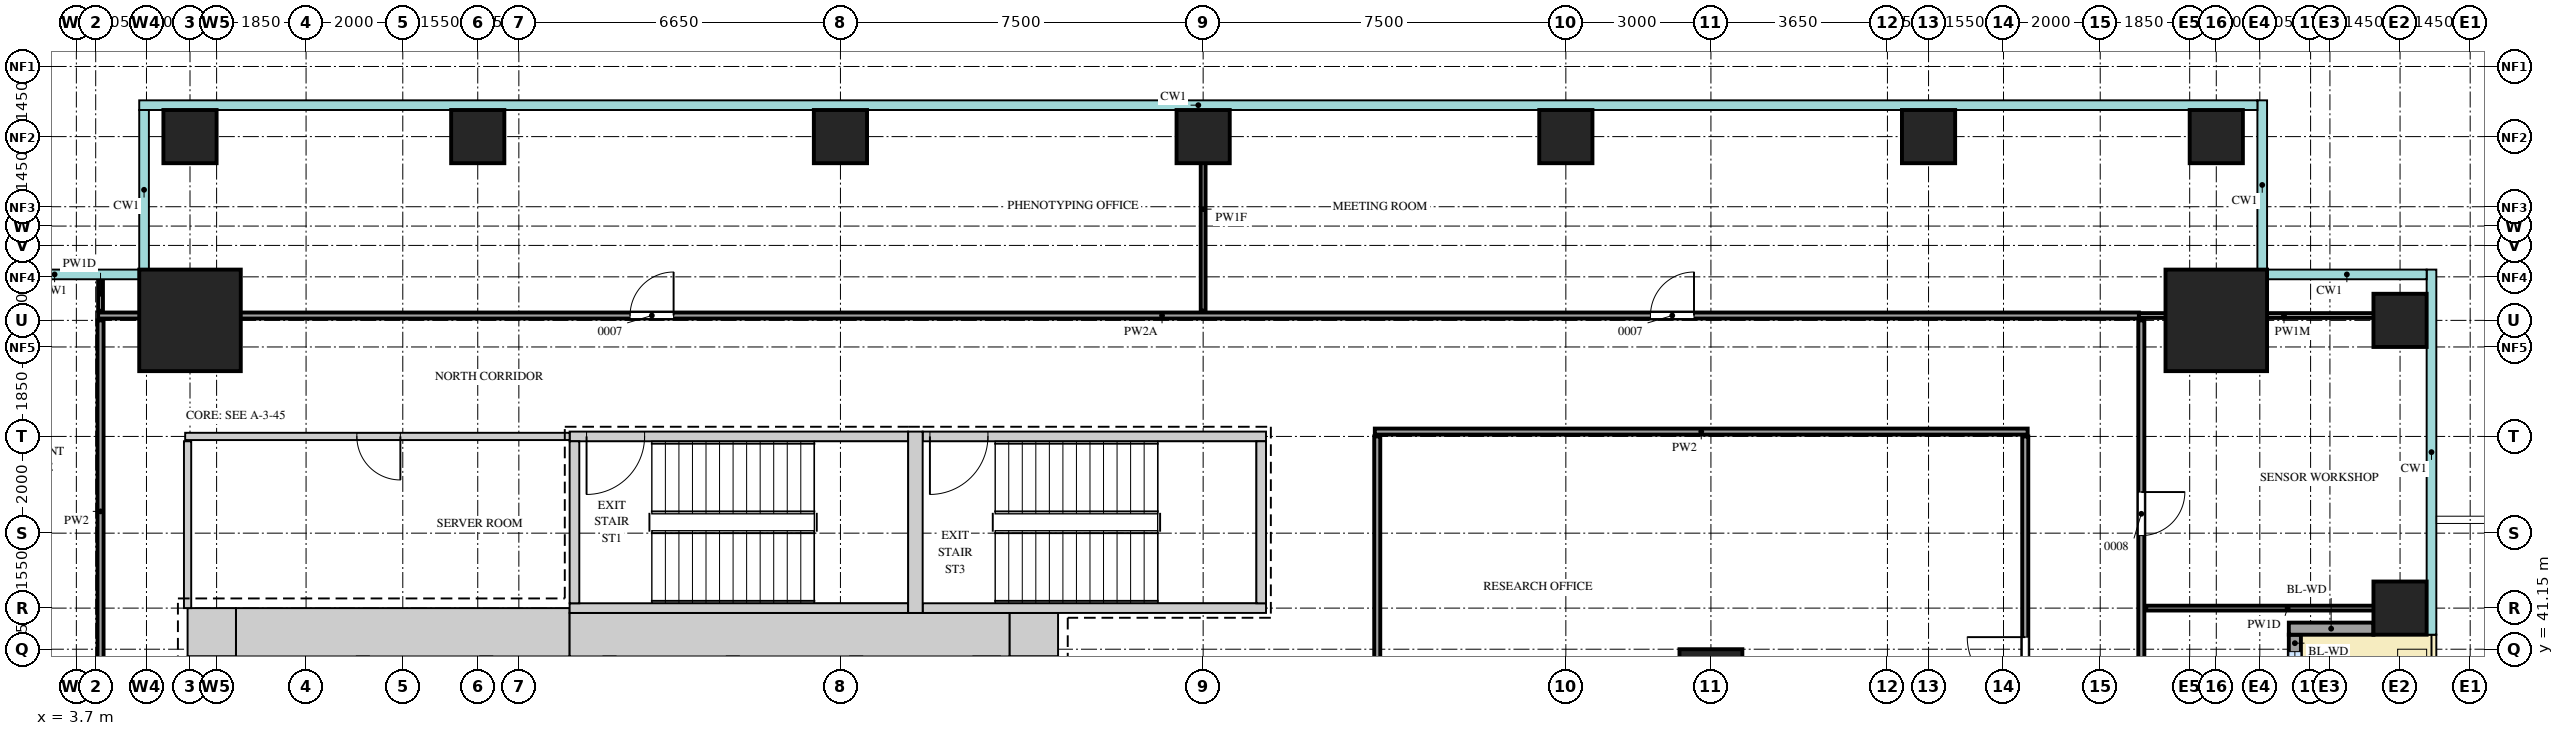
"""IFC4 building model, lengths in metres.
Left out: names, types, materials, properties, quantities, classifications, styles, units other than length and angle.
Written with IfcOpenShell. Run it as: python <this file> out.ifc"""

import sys

from ifc_helpers import new_model, si_unit, direction, frame, frame_2d, origin, origin_2d, place, context, subcontext, project, spatial, rectangle, extrude, source, transform, mapped, element, fill, save


model = new_model("IFC4")
c1 = context("Model", 3, precision=1e-05, world=origin(), true_north=direction((0.0, 1.0)))
c2 = subcontext(c1, "Body", "Model", "MODEL_VIEW")
j1 = project(units=[si_unit("LENGTHUNIT", "METRE"), si_unit("PLANEANGLEUNIT", "RADIAN")], contexts=[c1])
p1 = place(None, origin())
s1 = spatial("IfcSite", under=j1, at=p1, CompositionType="ELEMENT")
p2 = place(p1, origin())
s2 = spatial("IfcBuilding", under=s1, at=p2, CompositionType="ELEMENT")
p3 = place(p2, frame((0.0, 0.0, 132.3)))
s3 = spatial("IfcBuildingStorey", under=s2, at=p3, CompositionType="ELEMENT", Elevation=132.3)
m1 = source(origin(), c2, "Body", "SweptSolid", [
    extrude(rectangle(XDim=6.9, YDim=1.0, at=frame_2d((3.45, 0.0))), origin(), (0.0, 0.0, 1.0), 4.1),
])
p4 = place(p3, frame((7.0, 41.5, 0.0), z_axis=(0.0, 0.0, 1.0), x_axis=(1.0, 0.0, 0.0)))
e1 = element("IfcWall", 1, at=p4, inside=s3, PredefinedType="SHEAR", context=c2, shape_type="MappedRepresentation", body=[
    mapped(m1, transform((0.0, 0.0, 0.0))),
])
m2 = source(origin(), c2, "Body", "SweptSolid", [
    extrude(rectangle(XDim=9.1, YDim=0.9, at=frame_2d((4.55, 0.0))), origin(), (0.0, 0.0, 1.0), 4.1),
])
p5 = place(p3, frame((13.9, 41.45, 0.0), z_axis=(0.0, 0.0, 1.0), x_axis=(1.0, 0.0, 0.0)))
e2 = element("IfcWall", 2, at=p5, inside=s3, PredefinedType="SHEAR", context=c2, shape_type="MappedRepresentation", body=[
    mapped(m2, transform((0.0, 0.0, 0.0))),
])
m3 = source(origin(), c2, "Body", "SweptSolid", [
    extrude(rectangle(XDim=1.0, YDim=0.9, at=frame_2d((0.5, 0.0))), origin(), (0.0, 0.0, 1.0), 4.1),
])
p6 = place(p3, frame((23.0, 41.45, 0.0), z_axis=(0.0, 0.0, 1.0), x_axis=(1.0, 0.0, 0.0)))
e3 = element("IfcWall", 3, at=p6, inside=s3, PredefinedType="SHEAR", context=c2, shape_type="MappedRepresentation", body=[
    mapped(m3, transform((0.0, 0.0, 0.0))),
])
m4 = source(origin(), c2, "Body", "SweptSolid", [
    extrude(rectangle(XDim=1.0, YDim=1.0, at=frame_2d((0.5, 0.0))), origin(), (0.0, 0.0, 1.0), 4.1),
])
p7 = place(p3, frame((6.0, 41.5, 0.0), z_axis=(0.0, 0.0, 1.0), x_axis=(1.0, 0.0, 0.0)))
e4 = element("IfcWall", 4, at=p7, inside=s3, PredefinedType="SHEAR", context=c2, shape_type="MappedRepresentation", body=[
    mapped(m4, transform((0.0, 0.0, 0.0))),
])
m5 = source(origin(), c2, "Body", "SweptSolid", [
    extrude(rectangle(XDim=7.0, YDim=0.2, at=frame_2d((3.5, 0.0))), origin(), (0.0, 0.0, 1.0), 4.1),
])
p8 = place(p3, frame((13.9, 45.55, 0.0), z_axis=(0.0, 0.0, 1.0), x_axis=(1.0, 0.0, 0.0)))
e5 = element("IfcWall", 5, at=p8, inside=s3, PredefinedType="SHEAR", context=c2, shape_type="MappedRepresentation", body=[
    mapped(m5, transform((0.0, 0.0, 0.0))),
])
m6 = source(origin(), c2, "Body", "SweptSolid", [
    extrude(rectangle(XDim=1.2, YDim=2.1, at=frame_2d((0.6, 1.05))), frame((0.0, 0.11, 0.0), z_axis=(0.0, -1.0, 0.0), x_axis=(1.0, 0.0, 0.0)), (0.0, 0.0, 1.0), 0.22),
])
p9 = place(p8, frame((0.35, 0.0, 0.0)))
e6 = element("IfcOpeningElement", 6, at=p9, cuts=e5, PredefinedType="OPENING", context=c2, shape_type="MappedRepresentation", body=[
    mapped(m6, transform((0.0, 0.0, 0.0))),
])
p10 = place(p3, frame((13.9, 42.0, 0.0), z_axis=(0.0, 0.0, 1.0), x_axis=(1.0, 0.0, 0.0)))
e7 = element("IfcWall", 7, at=p10, inside=s3, PredefinedType="SHEAR", context=c2, shape_type="MappedRepresentation", body=[
    mapped(m5, transform((0.0, 0.0, 0.0))),
])
m7 = source(origin(), c2, "Body", "SweptSolid", [
    extrude(rectangle(XDim=7.1, YDim=0.2, at=frame_2d((3.55, 0.0))), origin(), (0.0, 0.0, 1.0), 4.1),
])
p11 = place(p3, frame((21.2, 45.55, 0.0), z_axis=(0.0, 0.0, 1.0), x_axis=(1.0, 0.0, 0.0)))
e8 = element("IfcWall", 8, at=p11, inside=s3, PredefinedType="SHEAR", context=c2, shape_type="MappedRepresentation", body=[
    mapped(m7, transform((0.0, 0.0, 0.0))),
])
p12 = place(p11, frame((0.15, 0.0, 0.0)))
e9 = element("IfcOpeningElement", 9, at=p12, cuts=e8, PredefinedType="OPENING", context=c2, shape_type="MappedRepresentation", body=[
    mapped(m6, transform((0.0, 0.0, 0.0))),
])
p13 = place(p3, frame((21.2, 42.0, 0.0), z_axis=(0.0, 0.0, 1.0), x_axis=(1.0, 0.0, 0.0)))
e10 = element("IfcWall", 10, at=p13, inside=s3, PredefinedType="SHEAR", context=c2, shape_type="MappedRepresentation", body=[
    mapped(m7, transform((0.0, 0.0, 0.0))),
])
m8 = source(origin(), c2, "Body", "SweptSolid", [
    extrude(rectangle(XDim=3.75, YDim=0.3, at=frame_2d((1.875, 0.0))), origin(), (0.0, 0.0, 1.0), 4.1),
])
p14 = place(p3, frame((21.05, 41.9, 0.0), z_axis=(0.0, 0.0, 1.0), x_axis=(0.0, 1.0, 0.0)))
e11 = element("IfcWall", 11, at=p14, inside=s3, PredefinedType="SHEAR", context=c2, shape_type="MappedRepresentation", body=[
    mapped(m8, transform((0.0, 0.0, 0.0))),
])
m9 = source(origin(), c2, "Body", "SweptSolid", [
    extrude(rectangle(XDim=3.35, YDim=0.2, at=frame_2d((1.675, 0.0))), origin(), (0.0, 0.0, 1.0), 4.1),
])
for number, where, z_axis, x_axis in (
    (12, (14.0, 42.1, 0.0), (0.0, 0.0, 1.0), (0.0, 1.0, 0.0)),
    (13, (28.2, 42.1, 0.0), (0.0, 0.0, 1.0), (0.0, 1.0, 0.0)),
):
    element("IfcWall", number, at=place(p3, frame(where, z_axis=z_axis, x_axis=x_axis)), inside=s3, PredefinedType="SHEAR", context=c2, shape_type="MappedRepresentation", body=[
        mapped(m9, transform((0.0, 0.0, 0.0))),
    ])
m10 = source(origin(), c2, "Body", "SweptSolid", [
    extrude(rectangle(XDim=2.1, YDim=2.1, at=origin_2d()), origin(), (0.0, 0.0, 1.0), 4.4),
])
for number, where, z_axis, x_axis in (
    (14, (47.95, 47.95, 0.0), (0.0, 0.0, 1.0), (1.0, 0.0, 0.0)),
    (15, (6.05, 47.95, 0.0), (0.0, 0.0, 1.0), (1.0, 0.0, 0.0)),
):
    element("IfcColumn", number, at=place(p3, frame(where, z_axis=z_axis, x_axis=x_axis)), inside=s3, PredefinedType="COLUMN", context=c2, shape_type="MappedRepresentation", body=[
        mapped(m10, transform((0.0, 0.0, 0.0))),
    ])
m11 = source(origin(), c2, "Body", "SweptSolid", [
    extrude(rectangle(XDim=1.1, YDim=1.1, at=origin_2d()), origin(), (0.0, 0.0, 1.0), 4.1),
])
for number, where, z_axis, x_axis in (
    (16, (51.75, 42.0, 0.0), (0.0, 0.0, 1.0), (1.0, 0.0, 0.0)),
    (17, (51.75, 47.95, 0.0), (0.0, 0.0, 1.0), (1.0, 0.0, 0.0)),
    (18, (6.05, 51.75, 0.0), (0.0, 0.0, 1.0), (1.0, 0.0, 0.0)),
    (19, (12.0, 51.75, 0.0), (0.0, 0.0, 1.0), (1.0, 0.0, 0.0)),
    (20, (19.5, 51.75, 0.0), (0.0, 0.0, 1.0), (1.0, 0.0, 0.0)),
    (21, (27.0, 51.75, 0.0), (0.0, 0.0, 1.0), (1.0, 0.0, 0.0)),
    (22, (34.5, 51.75, 0.0), (0.0, 0.0, 1.0), (1.0, 0.0, 0.0)),
    (23, (42.0, 51.75, 0.0), (0.0, 0.0, 1.0), (1.0, 0.0, 0.0)),
    (24, (47.95, 51.75, 0.0), (0.0, 0.0, 1.0), (1.0, 0.0, 0.0)),
):
    element("IfcColumn", number, at=place(p3, frame(where, z_axis=z_axis, x_axis=x_axis)), inside=s3, PredefinedType="COLUMN", context=c2, shape_type="MappedRepresentation", body=[
        mapped(m11, transform((0.0, 0.0, 0.0))),
    ])
m12 = source(origin(), c2, "Body", "SweptSolid", [
    extrude(rectangle(XDim=1.3, YDim=1.3, at=origin_2d()), origin(), (0.0, 0.0, 1.0), 4.1),
])
p15 = place(p3, frame((37.5, 40.5, 0.0), z_axis=(0.0, 0.0, 1.0), x_axis=(1.0, 0.0, 0.0)))
e25 = element("IfcColumn", 25, at=p15, inside=s3, PredefinedType="COLUMN", context=c2, shape_type="MappedRepresentation", body=[
    mapped(m12, transform((0.0, 0.0, 0.0))),
])
m13 = source(origin(), c2, "Body", "SweptSolid", [
    extrude(rectangle(XDim=6.4, YDim=0.25, at=frame_2d((3.2, 0.0))), origin(), (0.0, 0.0, 1.0), 3.55),
])
p16 = place(p3, frame((49.575, 35.05, 0.0), z_axis=(0.0, 0.0, 1.0), x_axis=(0.0, 1.0, 0.0)))
e26 = element("IfcWall", 26, at=p16, inside=s3, PredefinedType="SOLIDWALL", context=c2, shape_type="MappedRepresentation", body=[
    mapped(m13, transform((0.0, 0.0, 0.0))),
])
m14 = source(origin(), c2, "Body", "SweptSolid", [
    extrude(rectangle(XDim=1.65, YDim=2.4, at=frame_2d((0.825, 1.2))), frame((0.0, 0.135, 0.0), z_axis=(0.0, -1.0, 0.0), x_axis=(1.0, 0.0, 0.0)), (0.0, 0.0, 1.0), 0.27),
])
p17 = place(p16, frame((0.35, 0.0, 0.0)))
e27 = element("IfcOpeningElement", 27, at=p17, cuts=e26, PredefinedType="OPENING", context=c2, shape_type="MappedRepresentation", body=[
    mapped(m14, transform((0.0, 0.0, 0.0))),
])
p18 = place(p16, frame((4.4, 0.0, 0.0)))
e28 = element("IfcOpeningElement", 28, at=p18, cuts=e26, PredefinedType="OPENING", context=c2, shape_type="MappedRepresentation", body=[
    mapped(m14, transform((0.0, 0.0, 0.0))),
])
m15 = source(origin(), c2, "Body", "SweptSolid", [
    extrude(rectangle(XDim=1.8, YDim=2.4, at=frame_2d((0.9, 1.2))), frame((0.0, 0.135, 0.0), z_axis=(0.0, -1.0, 0.0), x_axis=(1.0, 0.0, 0.0)), (0.0, 0.0, 1.0), 0.27),
])
p19 = place(p16, frame((2.3, 0.0, 0.0)))
e29 = element("IfcOpeningElement", 29, at=p19, cuts=e26, PredefinedType="OPENING", context=c2, shape_type="MappedRepresentation", body=[
    mapped(m15, transform((0.0, 0.0, 0.0))),
])
m16 = source(origin(), c2, "Body", "SweptSolid", [
    extrude(rectangle(XDim=1.75, YDim=0.25, at=frame_2d((0.875, 0.0))), origin(), (0.0, 0.0, 1.0), 3.55),
])
p20 = place(p3, frame((51.2, 41.575, 0.0), z_axis=(0.0, 0.0, 1.0), x_axis=(-1.0, 0.0, 0.0)))
e30 = element("IfcWall", 30, at=p20, inside=s3, PredefinedType="SOLIDWALL", context=c2, shape_type="MappedRepresentation", body=[
    mapped(m16, transform((0.0, 0.0, 0.0))),
])
m17 = source(origin(), c2, "Body", "SweptSolid", [
    extrude(rectangle(XDim=37.65, YDim=0.125, at=frame_2d((18.825, 0.0))), origin(), (0.0, 0.0, 1.0), 4.2),
])
p21 = place(p3, frame((46.4, 10.3, 0.0), z_axis=(0.0, 0.0, 1.0), x_axis=(0.0, 1.0, 0.0)))
e31 = element("IfcWall", 31, at=p21, inside=s3, PredefinedType="PARTITIONING", context=c2, shape_type="MappedRepresentation", body=[
    mapped(m17, transform((0.0, 0.0, 0.0))),
])
m18 = source(origin(), c2, "Body", "SweptSolid", [
    extrude(rectangle(XDim=1.2, YDim=2.1, at=frame_2d((0.6, 1.05))), frame((0.0, 0.073, 0.0), z_axis=(0.0, -1.0, 0.0), x_axis=(1.0, 0.0, 0.0)), (0.0, 0.0, 1.0), 0.145),
])
p22 = place(p21, frame((7.85, 0.0, 0.0)))
e32 = element("IfcOpeningElement", 32, at=p22, cuts=e31, PredefinedType="OPENING", context=c2, shape_type="MappedRepresentation", body=[
    mapped(m18, transform((0.0, 0.0, 0.0))),
])
m19 = source(origin(), c2, "Body", "SweptSolid", [
    extrude(rectangle(XDim=0.9, YDim=2.1, at=frame_2d((0.45, 1.05))), frame((0.0, 0.073, 0.0), z_axis=(0.0, -1.0, 0.0), x_axis=(1.0, 0.0, 0.0)), (0.0, 0.0, 1.0), 0.145),
])
p23 = place(p21, frame((23.6, 0.0, 0.0)))
e33 = element("IfcOpeningElement", 33, at=p23, cuts=e31, PredefinedType="OPENING", context=c2, shape_type="MappedRepresentation", body=[
    mapped(m19, transform((0.0, 0.0, 0.0))),
])
p24 = place(p21, frame((33.2, 0.0, 0.0)))
e34 = element("IfcOpeningElement", 34, at=p24, cuts=e31, PredefinedType="OPENING", context=c2, shape_type="MappedRepresentation", body=[
    mapped(m19, transform((0.0, 0.0, 0.0))),
])
m20 = source(origin(), c2, "Body", "SweptSolid", [
    extrude(rectangle(XDim=27.45, YDim=0.125, at=frame_2d((13.725, 0.0))), origin(), (0.0, 0.0, 1.0), 4.2),
])
p25 = place(p3, frame((44.0, 18.1, 0.0), z_axis=(0.0, 0.0, 1.0), x_axis=(0.0, 1.0, 0.0)))
e35 = element("IfcWall", 35, at=p25, inside=s3, PredefinedType="PARTITIONING", context=c2, shape_type="MappedRepresentation", body=[
    mapped(m20, transform((0.0, 0.0, 0.0))),
])
p26 = place(p25, frame((8.3, 0.0, 0.0)))
e36 = element("IfcOpeningElement", 36, at=p26, cuts=e35, PredefinedType="OPENING", context=c2, shape_type="MappedRepresentation", body=[
    mapped(m18, transform((0.0, 0.0, 0.0))),
])
p27 = place(p25, frame((22.1, 0.0, 0.0)))
e37 = element("IfcOpeningElement", 37, at=p27, cuts=e35, PredefinedType="OPENING", context=c2, shape_type="MappedRepresentation", body=[
    mapped(m18, transform((0.0, 0.0, 0.0))),
])
m21 = source(origin(), c2, "Body", "SweptSolid", [
    extrude(rectangle(XDim=13.75, YDim=0.125, at=frame_2d((6.875, 0.0))), origin(), (0.0, 0.0, 1.0), 4.2),
])
p28 = place(p3, frame((4.2, 34.2, 0.0), z_axis=(0.0, 0.0, 1.0), x_axis=(0.0, 1.0, 0.0)))
e38 = element("IfcWall", 38, at=p28, inside=s3, PredefinedType="PARTITIONING", context=c2, shape_type="MappedRepresentation", body=[
    mapped(m21, transform((0.0, 0.0, 0.0))),
])
p29 = place(p28, frame((4.95, 0.0, 0.0)))
e39 = element("IfcOpeningElement", 39, at=p29, cuts=e38, PredefinedType="OPENING", context=c2, shape_type="MappedRepresentation", body=[
    mapped(m19, transform((0.0, 0.0, 0.0))),
])
m22 = source(origin(), c2, "Body", "SweptSolid", [
    extrude(rectangle(XDim=9.45, YDim=0.125, at=frame_2d((4.725, 0.0))), origin(), (0.0, 0.0, 1.0), 4.2),
])
p30 = place(p3, frame((30.6, 36.1, 0.0), z_axis=(0.0, 0.0, 1.0), x_axis=(0.0, 1.0, 0.0)))
e40 = element("IfcWall", 40, at=p30, inside=s3, PredefinedType="PARTITIONING", context=c2, shape_type="MappedRepresentation", body=[
    mapped(m22, transform((0.0, 0.0, 0.0))),
])
m23 = source(origin(), c2, "Body", "SweptSolid", [
    extrude(rectangle(XDim=3.45, YDim=0.15, at=frame_2d((1.725, 0.0))), origin(), (0.0, 0.0, 1.0), 4.2),
])
p31 = place(p3, frame((6.0, 42.0, 0.0), z_axis=(0.0, 0.0, 1.0), x_axis=(0.0, 1.0, 0.0)))
e41 = element("IfcWall", 41, at=p31, inside=s3, PredefinedType="PARTITIONING", context=c2, shape_type="MappedRepresentation", body=[
    mapped(m23, transform((0.0, 0.0, 0.0))),
])
m24 = source(origin(), c2, "Body", "SweptSolid", [
    extrude(rectangle(XDim=5.85, YDim=0.1, at=frame_2d((2.925, 0.0))), origin(), (0.0, 0.0, 1.0), 4.2),
])
p32 = place(p3, frame((46.5, 42.0, 0.0), z_axis=(0.0, 0.0, 1.0), x_axis=(1.0, 0.0, 0.0)))
e42 = element("IfcWall", 42, at=p32, inside=s3, PredefinedType="PARTITIONING", context=c2, shape_type="MappedRepresentation", body=[
    mapped(m24, transform((0.0, 0.0, 0.0))),
])
m25 = source(origin(), c2, "Body", "SweptSolid", [
    extrude(rectangle(XDim=7.95, YDim=0.15, at=frame_2d((3.975, 0.0))), origin(), (0.0, 0.0, 1.0), 4.2),
])
p33 = place(p3, frame((5.95, 45.55, 0.0), z_axis=(0.0, 0.0, 1.0), x_axis=(1.0, 0.0, 0.0)))
e43 = element("IfcWall", 43, at=p33, inside=s3, PredefinedType="PARTITIONING", context=c2, shape_type="MappedRepresentation", body=[
    mapped(m25, transform((0.0, 0.0, 0.0))),
])
m26 = source(origin(), c2, "Body", "SweptSolid", [
    extrude(rectangle(XDim=0.9, YDim=2.1, at=frame_2d((0.45, 1.05))), frame((0.0, 0.085, 0.0), z_axis=(0.0, -1.0, 0.0), x_axis=(1.0, 0.0, 0.0)), (0.0, 0.0, 1.0), 0.17),
])
p34 = place(p33, frame((3.55, 0.0, 0.0)))
e44 = element("IfcOpeningElement", 44, at=p34, cuts=e43, PredefinedType="OPENING", context=c2, shape_type="MappedRepresentation", body=[
    mapped(m26, transform((0.0, 0.0, 0.0))),
])
m27 = source(origin(), c2, "Body", "SweptSolid", [
    extrude(rectangle(XDim=13.5, YDim=0.125, at=frame_2d((6.75, 0.0))), origin(), (0.0, 0.0, 1.0), 4.2),
])
p35 = place(p3, frame((30.55, 45.65, 0.0), z_axis=(0.0, 0.0, 1.0), x_axis=(1.0, 0.0, 0.0)))
e45 = element("IfcWall", 45, at=p35, inside=s3, PredefinedType="PARTITIONING", context=c2, shape_type="MappedRepresentation", body=[
    mapped(m27, transform((0.0, 0.0, 0.0))),
])
m28 = source(origin(), c2, "Body", "SweptSolid", [
    extrude(rectangle(XDim=42.2, YDim=0.125, at=frame_2d((21.1, 0.0))), origin(), (0.0, 0.0, 1.0), 3.55),
])
p36 = place(p3, frame((4.15, 48.05, 0.0), z_axis=(0.0, 0.0, 1.0), x_axis=(1.0, 0.0, 0.0)))
e46 = element("IfcWall", 46, at=p36, inside=s3, PredefinedType="PARTITIONING", context=c2, shape_type="MappedRepresentation", body=[
    mapped(m28, transform((0.0, 0.0, 0.0))),
])
p37 = place(p36, frame((11.0, 0.0, 0.0)))
e47 = element("IfcOpeningElement", 47, at=p37, cuts=e46, PredefinedType="OPENING", context=c2, shape_type="MappedRepresentation", body=[
    mapped(m19, transform((0.0, 0.0, 0.0))),
])
p38 = place(p36, frame((32.1, 0.0, 0.0)))
e48 = element("IfcOpeningElement", 48, at=p38, cuts=e46, PredefinedType="OPENING", context=c2, shape_type="MappedRepresentation", body=[
    mapped(m19, transform((0.0, 0.0, 0.0))),
])
m29 = source(origin(), c2, "Body", "SweptSolid", [
    extrude(rectangle(XDim=6.0, YDim=0.1, at=frame_2d((3.0, 0.0))), origin(), (0.0, 0.0, 1.0), 3.55),
])
p39 = place(p3, frame((46.35, 48.05, 0.0), z_axis=(0.0, 0.0, 1.0), x_axis=(1.0, 0.0, 0.0)))
e49 = element("IfcWall", 49, at=p39, inside=s3, PredefinedType="PARTITIONING", context=c2, shape_type="MappedRepresentation", body=[
    mapped(m29, transform((0.0, 0.0, 0.0))),
])
m30 = source(origin(), c2, "Body", "SweptSolid", [
    extrude(rectangle(XDim=0.7, YDim=0.1, at=frame_2d((0.35, 0.0))), origin(), (0.0, 0.0, 1.0), 4.2),
])
p40 = place(p3, frame((4.2, 48.15, 0.0), z_axis=(0.0, 0.0, 1.0), x_axis=(0.0, 1.0, 0.0)))
e50 = element("IfcWall", 50, at=p40, inside=s3, PredefinedType="PARTITIONING", context=c2, shape_type="MappedRepresentation", body=[
    mapped(m30, transform((0.0, 0.0, 0.0))),
])
m31 = source(origin(), c2, "Body", "SweptSolid", [
    extrude(rectangle(XDim=4.2, YDim=0.1, at=frame_2d((2.1, 0.0))), origin(), (0.0, 0.0, 1.0), 3.77),
])
p41 = place(p3, frame((27.0, 48.15, 0.0), z_axis=(0.0, 0.0, 1.0), x_axis=(0.0, 1.0, 0.0)))
e51 = element("IfcWall", 51, at=p41, inside=s3, PredefinedType="PARTITIONING", context=c2, shape_type="MappedRepresentation", body=[
    mapped(m31, transform((0.0, 0.0, 0.0))),
])
m32 = source(origin(), c2, "Body", "SweptSolid", [
    extrude(rectangle(XDim=1.65, YDim=2.4, at=frame_2d((0.825, 1.2))), frame((0.0, 0.03, 0.0), z_axis=(0.0, -1.0, 0.0), x_axis=(1.0, 0.0, 0.0)), (0.0, 0.0, 1.0), 0.06),
])
p42 = place(p18, origin())
e52 = element("IfcWindow", 52, at=p42, inside=s3, PartitioningType="SINGLE_PANEL", PredefinedType="WINDOW", context=c2, shape_type="MappedRepresentation", body=[
    mapped(m32, transform((0.0, 0.0, 0.0))),
])
fill(e28, e52)
m33 = source(origin(), c2, "Body", "SweptSolid", [
    extrude(rectangle(XDim=1.2, YDim=2.1, at=frame_2d((0.6, 1.05))), frame((0.0, 0.025, 0.0), z_axis=(0.0, -1.0, 0.0), x_axis=(1.0, 0.0, 0.0)), (0.0, 0.0, 1.0), 0.05),
])
p43 = place(p27, origin())
e53 = element("IfcDoor", 53, at=p43, inside=s3, OperationType="SINGLE_SWING_LEFT", PredefinedType="DOOR", context=c2, shape_type="MappedRepresentation", body=[
    mapped(m33, transform((0.0, 0.0, 0.0))),
])
fill(e37, e53)
m34 = source(origin(), c2, "Body", "SweptSolid", [
    extrude(rectangle(XDim=0.9, YDim=2.1, at=frame_2d((0.45, 1.05))), frame((0.0, 0.025, 0.0), z_axis=(0.0, -1.0, 0.0), x_axis=(1.0, 0.0, 0.0)), (0.0, 0.0, 1.0), 0.05),
])
p44 = place(p24, origin())
e54 = element("IfcDoor", 54, at=p44, inside=s3, OperationType="SINGLE_SWING_RIGHT", PredefinedType="DOOR", context=c2, shape_type="MappedRepresentation", body=[
    mapped(m34, transform((0.0, 0.0, 0.0))),
])
fill(e34, e54)
p45 = place(p37, origin())
e55 = element("IfcDoor", 55, at=p45, inside=s3, OperationType="SINGLE_SWING_LEFT", PredefinedType="DOOR", context=c2, shape_type="MappedRepresentation", body=[
    mapped(m34, transform((0.0, 0.0, 0.0))),
])
fill(e47, e55)
p46 = place(p38, origin())
e56 = element("IfcDoor", 56, at=p46, inside=s3, OperationType="SINGLE_SWING_LEFT", PredefinedType="DOOR", context=c2, shape_type="MappedRepresentation", body=[
    mapped(m34, transform((0.0, 0.0, 0.0))),
])
fill(e48, e56)
p47 = place(p34, origin())
e57 = element("IfcDoor", 57, at=p47, inside=s3, OperationType="SINGLE_SWING_RIGHT", PredefinedType="DOOR", context=c2, shape_type="MappedRepresentation", body=[
    mapped(m34, transform((0.0, 0.0, 0.0))),
])
fill(e44, e57)
p48 = place(p9, origin())
e58 = element("IfcDoor", 58, at=p48, inside=s3, OperationType="SINGLE_SWING_LEFT", PredefinedType="DOOR", context=c2, shape_type="MappedRepresentation", body=[
    mapped(m33, transform((0.0, 0.0, 0.0))),
])
fill(e6, e58)
p49 = place(p12, origin())
e59 = element("IfcDoor", 59, at=p49, inside=s3, OperationType="SINGLE_SWING_LEFT", PredefinedType="DOOR", context=c2, shape_type="MappedRepresentation", body=[
    mapped(m33, transform((0.0, 0.0, 0.0))),
])
fill(e9, e59)
save(model, sys.argv[1])
